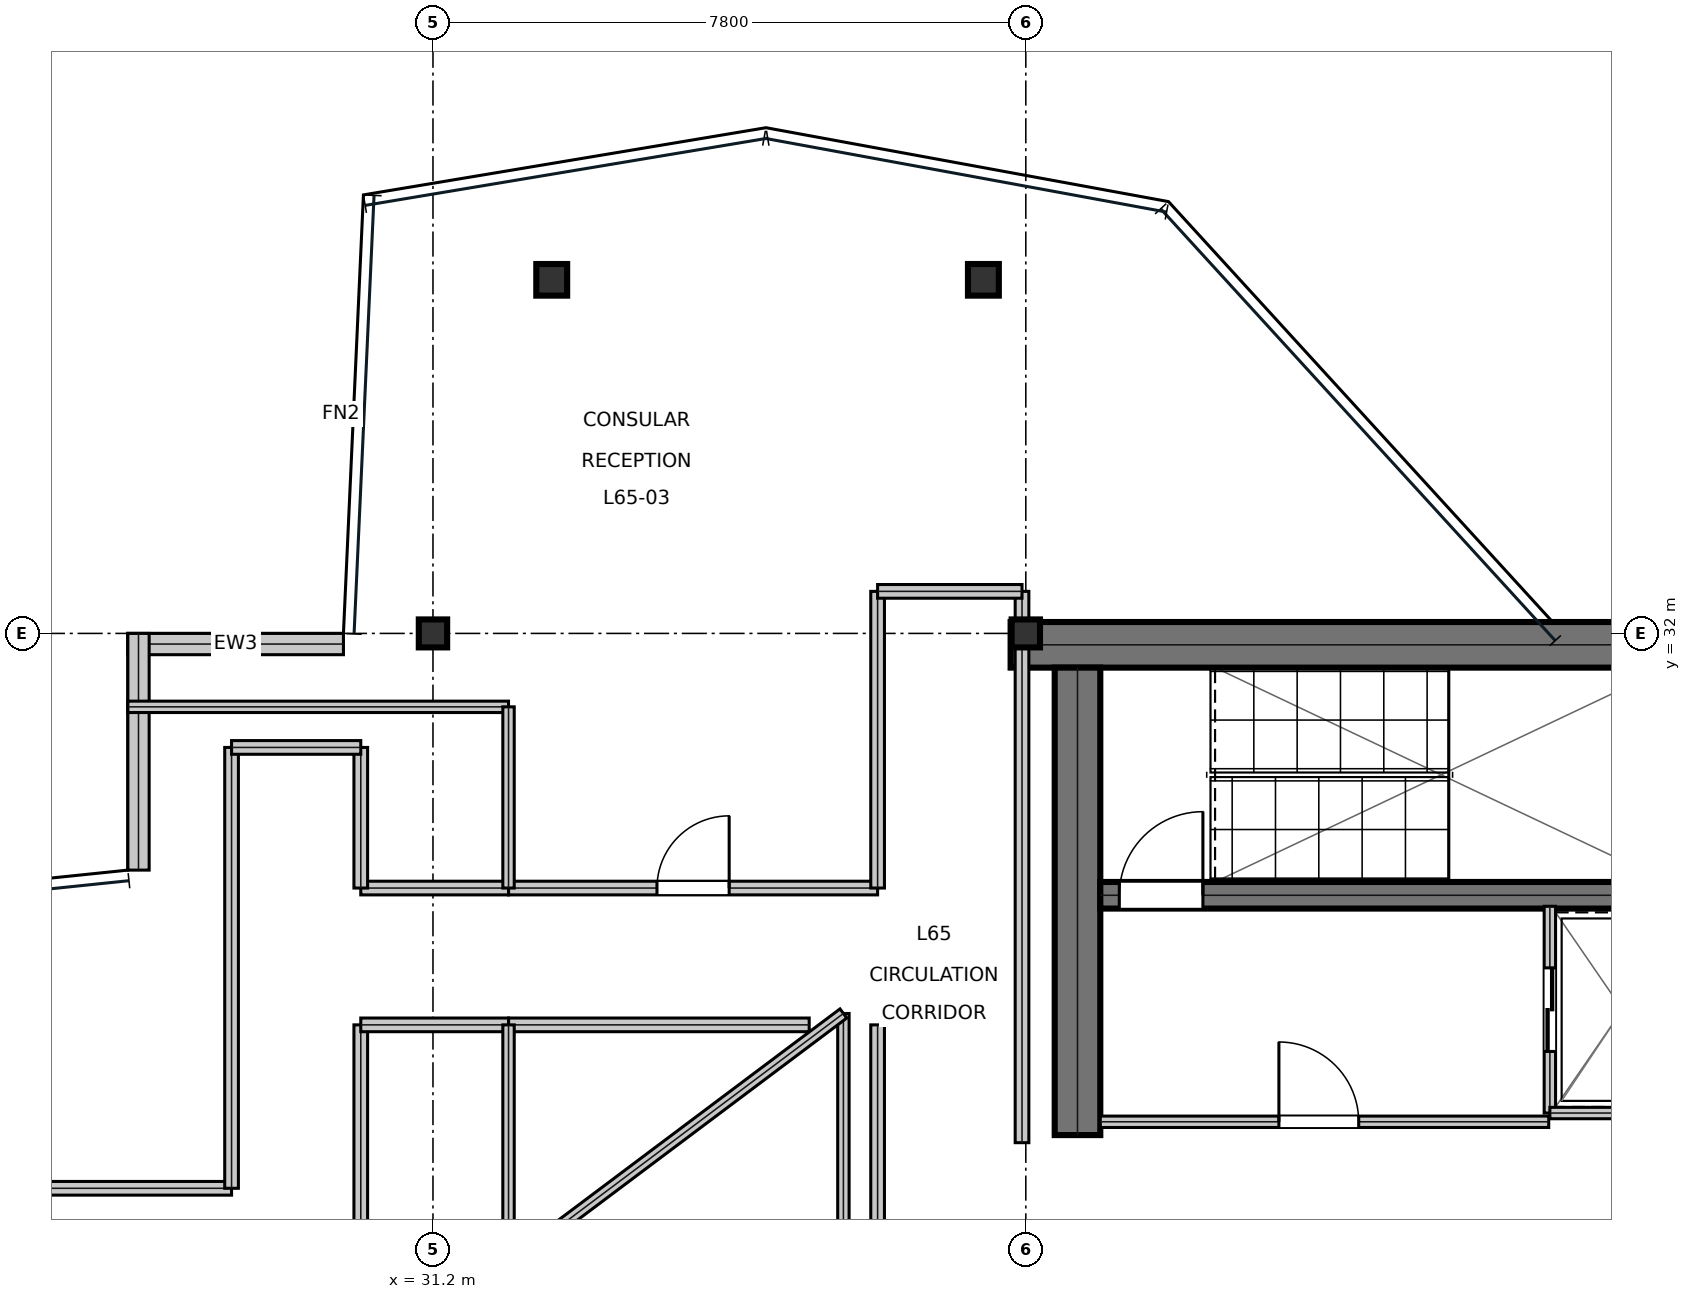
"""IFC4 building model, lengths in metres.
Left out: names, types, materials, properties, quantities, classifications, styles, units other than length and angle.
Written with IfcOpenShell. Run it as: python <this file> out.ifc"""

import sys

from ifc_helpers import new_model, si_unit, direction, frame, frame_2d, origin, origin_2d, place, context, subcontext, project, spatial, rectangle, i_section, extrude, element, fill, save


model = new_model("IFC4")
c1 = context("Model", 3, precision=1e-05, world=origin(), true_north=direction((0.0, 1.0)))
c2 = subcontext(c1, "Body", "Model", "MODEL_VIEW")
j1 = project(units=[si_unit("LENGTHUNIT", "METRE"), si_unit("PLANEANGLEUNIT", "RADIAN")], contexts=[c1])
p1 = place(None, origin())
s1 = spatial("IfcSite", under=j1, at=p1, CompositionType="ELEMENT")
p2 = place(p1, origin())
s2 = spatial("IfcBuilding", under=s1, at=p2, CompositionType="ELEMENT")
p3 = place(p2, frame((0.0, 0.0, 279.0)))
s3 = spatial("IfcBuildingStorey", under=s2, at=p3, CompositionType="ELEMENT", Elevation=279.0)
p4 = place(p3, frame((38.8, 31.85, 0.0), z_axis=(0.0, 0.0, 1.0), x_axis=(1.0, 0.0, 0.0)))
e1 = element("IfcWall", 1, at=p4, inside=s3, PredefinedType="SHEAR", context=c2, shape_type="SweptSolid", body=[
    extrude(rectangle(XDim=16.0, YDim=0.6, at=frame_2d((8.0, 0.0))), origin(), (0.0, 0.0, 1.0), 3.81),
])
p5 = place(p3, frame((39.68, 25.4, 0.0), z_axis=(0.0, 0.0, 1.0), x_axis=(0.0, 1.0, 0.0)))
e2 = element("IfcWall", 2, at=p5, inside=s3, PredefinedType="SHEAR", context=c2, shape_type="SweptSolid", body=[
    extrude(rectangle(XDim=6.15, YDim=0.6, at=frame_2d((3.075, 0.0))), origin(), (0.0, 0.0, 1.0), 3.81),
])
p6 = place(p3, frame((39.98, 28.555, 0.0), z_axis=(0.0, 0.0, 1.0), x_axis=(1.0, 0.0, 0.0)))
e3 = element("IfcWall", 3, at=p6, inside=s3, PredefinedType="SHEAR", context=c2, shape_type="SweptSolid", body=[
    extrude(rectangle(XDim=7.71, YDim=0.35, at=frame_2d((3.855, 0.0))), origin(), (0.0, 0.0, 1.0), 3.81),
])
p7 = place(p6, frame((0.25, 0.0, 0.0)))
e4 = element("IfcOpeningElement", 4, at=p7, cuts=e3, PredefinedType="OPENING", context=c2, shape_type="SweptSolid", body=[
    extrude(rectangle(XDim=1.1, YDim=2.15, at=frame_2d((0.55, 1.075))), frame((0.0, 0.185, 0.0), z_axis=(0.0, -1.0, 0.0), x_axis=(1.0, 0.0, 0.0)), (0.0, 0.0, 1.0), 0.37),
])
for number, where, z_axis, x_axis in (
    (5, (31.2, 32.0, 0.0), (0.0, 0.0, 1.0), (1.0, 0.0, 0.0)),
    (6, (39.0, 32.0, 0.0), (0.0, 0.0, 1.0), (1.0, 0.0, 0.0)),
):
    element("IfcColumn", number, at=place(p3, frame(where, z_axis=z_axis, x_axis=x_axis)), inside=s3, PredefinedType="COLUMN", context=c2, shape_type="SweptSolid", body=[
        extrude(i_section(OverallWidth=0.373, OverallDepth=0.368, WebThickness=0.015, FlangeThickness=0.024, at=origin_2d()), origin(), (0.0, 0.0, 1.0), 4.044),
    ])
for number, where, z_axis, x_axis in (
    (7, (32.762, 36.652, 0.016), (0.0, 0.0, 1.0), (1.0, 0.0, 0.0)),
    (8, (38.442, 36.652, 0.016), (0.0, 0.0, 1.0), (1.0, 0.0, 0.0)),
):
    element("IfcColumn", number, at=place(p3, frame(where, z_axis=z_axis, x_axis=x_axis)), inside=s3, PredefinedType="COLUMN", context=c2, shape_type="SweptSolid", body=[
        extrude(i_section(OverallWidth=0.406, OverallDepth=0.416, WebThickness=0.03, FlangeThickness=0.048, at=origin_2d()), origin(), (0.0, 0.0, 1.0), 4.018),
    ])
p8 = place(p3, frame((30.022, 31.86, 0.0), z_axis=(0.0, 0.0, 1.0), x_axis=(-1.0, 0.0, 0.0)))
e9 = element("IfcWall", 9, at=p8, inside=s3, PredefinedType="STANDARD", context=c2, shape_type="SweptSolid", body=[
    extrude(rectangle(XDim=2.836, YDim=0.28, at=frame_2d((1.418, 0.0))), origin(), (0.0, 0.0, 1.0), 3.81),
])
p9 = place(p3, frame((27.326, 32.0, 0.0), z_axis=(0.0, 0.0, 1.0), x_axis=(0.0, -1.0, 0.0)))
e10 = element("IfcWall", 10, at=p9, inside=s3, PredefinedType="STANDARD", context=c2, shape_type="SweptSolid", body=[
    extrude(rectangle(XDim=3.114, YDim=0.28, at=frame_2d((1.557, 0.0))), origin(), (0.0, 0.0, 1.0), 3.339),
])
p10 = place(p3, frame((39.98, 25.575, 0.0), z_axis=(0.0, 0.0, 1.0), x_axis=(1.0, 0.0, 0.0)))
e11 = element("IfcWall", 11, at=p10, inside=s3, PredefinedType="PARTITIONING", context=c2, shape_type="SweptSolid", body=[
    extrude(rectangle(XDim=5.9, YDim=0.15, at=frame_2d((2.95, 0.0))), origin(), (0.0, 0.0, 1.0), 3.81),
])
p11 = place(p10, frame((2.35, 0.0, 0.0)))
e12 = element("IfcOpeningElement", 12, at=p11, cuts=e11, PredefinedType="OPENING", context=c2, shape_type="SweptSolid", body=[
    extrude(rectangle(XDim=1.05, YDim=2.15, at=frame_2d((0.525, 1.075))), frame((0.0, 0.085, 0.0), z_axis=(0.0, -1.0, 0.0), x_axis=(1.0, 0.0, 0.0)), (0.0, 0.0, 1.0), 0.17),
])
p12 = place(p3, frame((45.895, 25.69, 0.0), z_axis=(0.0, 0.0, 1.0), x_axis=(0.0, 1.0, 0.0)))
e13 = element("IfcWall", 13, at=p12, inside=s3, PredefinedType="PARTITIONING", context=c2, shape_type="SweptSolid", body=[
    extrude(rectangle(XDim=2.72, YDim=0.15, at=frame_2d((1.36, 0.0))), origin(), (0.0, 0.0, 1.0), 3.81),
])
p13 = place(p12, frame((0.81, 0.0, 0.0)))
e14 = element("IfcOpeningElement", 14, at=p13, cuts=e13, PredefinedType="OPENING", context=c2, shape_type="SweptSolid", body=[
    extrude(rectangle(XDim=1.1, YDim=2.15, at=frame_2d((0.55, 1.075))), frame((0.0, 0.085, 0.0), z_axis=(0.0, -1.0, 0.0), x_axis=(1.0, 0.0, 0.0)), (0.0, 0.0, 1.0), 0.17),
])
p14 = place(p3, frame((45.895, 25.69, 0.0), z_axis=(0.0, 0.0, 1.0), x_axis=(1.0, 0.0, 0.0)))
e15 = element("IfcWall", 15, at=p14, inside=s3, PredefinedType="PARTITIONING", context=c2, shape_type="SweptSolid", body=[
    extrude(rectangle(XDim=1.915, YDim=0.15, at=frame_2d((0.958, 0.0))), origin(), (0.0, 0.0, 1.0), 3.81),
])
p15 = place(p3, frame((37.05, 15.447, 0.0), z_axis=(0.0, 0.0, 1.0), x_axis=(0.0, 1.0, 0.0)))
e16 = element("IfcWall", 16, at=p15, inside=s3, PredefinedType="SOLIDWALL", context=c2, shape_type="SweptSolid", body=[
    extrude(rectangle(XDim=11.403, YDim=0.18, at=frame_2d((5.702, 0.0))), origin(), (0.0, 0.0, 1.0), 3.27),
])
p16 = place(p15, frame((3.607, 0.0, 0.0)))
e17 = element("IfcOpeningElement", 17, at=p16, cuts=e16, PredefinedType="OPENING", context=c2, shape_type="SweptSolid", body=[
    extrude(rectangle(XDim=0.95, YDim=2.15, at=frame_2d((0.475, 1.075))), frame((0.0, 0.1, 0.0), z_axis=(0.0, -1.0, 0.0), x_axis=(1.0, 0.0, 0.0)), (0.0, 0.0, 1.0), 0.2),
])
p17 = place(p3, frame((30.25, 17.5, 0.0), z_axis=(0.0, 0.0, 1.0), x_axis=(0.0, 1.0, 0.0)))
e18 = element("IfcWall", 18, at=p17, inside=s3, PredefinedType="SOLIDWALL", context=c2, shape_type="SweptSolid", body=[
    extrude(rectangle(XDim=9.35, YDim=0.18, at=frame_2d((4.675, 0.0))), origin(), (0.0, 0.0, 1.0), 3.27),
])
p18 = place(p17, frame((4.02, 0.0, 0.0)))
e19 = element("IfcOpeningElement", 19, at=p18, cuts=e18, PredefinedType="OPENING", context=c2, shape_type="SweptSolid", body=[
    extrude(rectangle(XDim=0.95, YDim=2.15, at=frame_2d((0.475, 1.075))), frame((0.0, 0.1, 0.0), z_axis=(0.0, -1.0, 0.0), x_axis=(1.0, 0.0, 0.0)), (0.0, 0.0, 1.0), 0.2),
])
p19 = place(p3, frame((32.194, 28.65, 0.0), z_axis=(0.0, 0.0, 1.0), x_axis=(1.0, 0.0, 0.0)))
e20 = element("IfcWall", 20, at=p19, inside=s3, PredefinedType="SOLIDWALL", context=c2, shape_type="SweptSolid", body=[
    extrude(rectangle(XDim=4.856, YDim=0.18, at=frame_2d((2.428, 0.0))), origin(), (0.0, 0.0, 1.0), 3.81),
])
p20 = place(p19, frame((1.953, 0.0, 0.0)))
e21 = element("IfcOpeningElement", 21, at=p20, cuts=e20, PredefinedType="OPENING", context=c2, shape_type="SweptSolid", body=[
    extrude(rectangle(XDim=0.95, YDim=2.15, at=frame_2d((0.475, 1.075))), frame((0.0, 0.1, 0.0), z_axis=(0.0, -1.0, 0.0), x_axis=(1.0, 0.0, 0.0)), (0.0, 0.0, 1.0), 0.2),
])
p21 = place(p3, frame((32.194, 26.85, 0.0), z_axis=(0.0, 0.0, 1.0), x_axis=(1.0, 0.0, 0.0)))
e22 = element("IfcWall", 22, at=p21, inside=s3, PredefinedType="SOLIDWALL", context=c2, shape_type="SweptSolid", body=[
    extrude(rectangle(XDim=3.956, YDim=0.18, at=frame_2d((1.978, 0.0))), origin(), (0.0, 0.0, 1.0), 3.81),
])
p22 = place(p3, frame((21.0, 24.7, 0.0), z_axis=(0.0, 0.0, 1.0), x_axis=(1.0, 0.0, 0.0)))
e23 = element("IfcWall", 23, at=p22, inside=s3, PredefinedType="SOLIDWALL", context=c2, shape_type="SweptSolid", body=[
    extrude(rectangle(XDim=7.55, YDim=0.18, at=frame_2d((3.775, 0.0))), origin(), (0.0, 0.0, 1.0), 3.27),
])
p23 = place(p3, frame((28.55, 24.7, 0.0), z_axis=(0.0, 0.0, 1.0), x_axis=(0.0, 1.0, 0.0)))
e24 = element("IfcWall", 24, at=p23, inside=s3, PredefinedType="SOLIDWALL", context=c2, shape_type="SweptSolid", body=[
    extrude(rectangle(XDim=5.8, YDim=0.18, at=frame_2d((2.9, 0.0))), origin(), (0.0, 0.0, 1.0), 3.81),
])
for number, where, z_axis, x_axis in (
    (25, (30.25, 26.85, 0.0), (0.0, 0.0, 1.0), (1.0, 0.0, 0.0)),
    (26, (30.25, 28.65, 0.0), (0.0, 0.0, 1.0), (1.0, 0.0, 0.0)),
):
    element("IfcWall", number, at=place(p3, frame(where, z_axis=z_axis, x_axis=x_axis)), inside=s3, PredefinedType="SOLIDWALL", context=c2, shape_type="SweptSolid", body=[
        extrude(rectangle(XDim=1.944, YDim=0.18, at=frame_2d((0.972, 0.0))), origin(), (0.0, 0.0, 1.0), 3.27),
    ])
p24 = place(p3, frame((30.25, 28.65, 0.0), z_axis=(0.0, 0.0, 1.0), x_axis=(0.0, 1.0, 0.0)))
e27 = element("IfcWall", 27, at=p24, inside=s3, PredefinedType="SOLIDWALL", context=c2, shape_type="SweptSolid", body=[
    extrude(rectangle(XDim=1.85, YDim=0.18, at=frame_2d((0.925, 0.0))), origin(), (0.0, 0.0, 1.0), 3.81),
])
p25 = place(p3, frame((28.55, 30.5, 0.0), z_axis=(0.0, 0.0, 1.0), x_axis=(1.0, 0.0, 0.0)))
e28 = element("IfcWall", 28, at=p25, inside=s3, PredefinedType="SOLIDWALL", context=c2, shape_type="SweptSolid", body=[
    extrude(rectangle(XDim=1.7, YDim=0.18, at=frame_2d((0.85, 0.0))), origin(), (0.0, 0.0, 1.0), 3.81),
])
p26 = place(p3, frame((38.95, 25.3, 0.0), z_axis=(0.0, 0.0, 1.0), x_axis=(0.0, 1.0, 0.0)))
e29 = element("IfcWall", 29, at=p26, inside=s3, PredefinedType="SOLIDWALL", context=c2, shape_type="SweptSolid", body=[
    extrude(rectangle(XDim=7.253, YDim=0.18, at=frame_2d((3.626, 0.0))), origin(), (0.0, 0.0, 1.0), 3.27),
])
p27 = place(p3, frame((37.05, 28.65, 0.0), z_axis=(0.0, 0.0, 1.0), x_axis=(0.0, 1.0, 0.0)))
e30 = element("IfcWall", 30, at=p27, inside=s3, PredefinedType="SOLIDWALL", context=c2, shape_type="SweptSolid", body=[
    extrude(rectangle(XDim=3.903, YDim=0.18, at=frame_2d((1.952, 0.0))), origin(), (0.0, 0.0, 1.0), 3.27),
])
p28 = place(p3, frame((37.05, 32.553, 0.0), z_axis=(0.0, 0.0, 1.0), x_axis=(1.0, 0.0, 0.0)))
e31 = element("IfcWall", 31, at=p28, inside=s3, PredefinedType="SOLIDWALL", context=c2, shape_type="SweptSolid", body=[
    extrude(rectangle(XDim=1.9, YDim=0.18, at=frame_2d((0.95, 0.0))), origin(), (0.0, 0.0, 1.0), 3.27),
])
p29 = place(p3, frame((32.194, 15.794, 0.0), z_axis=(0.0, 0.0, 1.0), x_axis=(0.0, 1.0, 0.0)))
e32 = element("IfcWall", 32, at=p29, inside=s3, PredefinedType="MOVABLE", context=c2, shape_type="SweptSolid", body=[
    extrude(rectangle(XDim=11.056, YDim=0.15, at=frame_2d((5.528, 0.0))), origin(), (0.0, 0.0, 1.0), 3.27),
])
p30 = place(p3, frame((27.186, 31.034, 0.0), z_axis=(0.0, 0.0, 1.0), x_axis=(1.0, 0.0, 0.0)))
e33 = element("IfcWall", 33, at=p30, inside=s3, PredefinedType="MOVABLE", context=c2, shape_type="SweptSolid", body=[
    extrude(rectangle(XDim=5.009, YDim=0.15, at=frame_2d((2.504, 0.0))), origin(), (0.0, 0.0, 1.0), 3.27),
])
p31 = place(p3, frame((32.194, 28.65, 0.0), z_axis=(0.0, 0.0, 1.0), x_axis=(0.0, 1.0, 0.0)))
e34 = element("IfcWall", 34, at=p31, inside=s3, PredefinedType="MOVABLE", context=c2, shape_type="SweptSolid", body=[
    extrude(rectangle(XDim=2.384, YDim=0.15, at=frame_2d((1.192, 0.0))), origin(), (0.0, 0.0, 1.0), 3.54),
])
p32 = place(p3, frame((36.6, 21.0, 0.0), z_axis=(0.0, 0.0, 1.0), x_axis=(0.0, 1.0, 0.0)))
e35 = element("IfcWall", 35, at=p32, inside=s3, PredefinedType="MOVABLE", context=c2, shape_type="SweptSolid", body=[
    extrude(rectangle(XDim=6.0, YDim=0.15, at=frame_2d((3.0, 0.0))), origin(), (0.0, 0.0, 1.0), 3.81),
])
p33 = place(p3, frame((36.6, 27.0, 0.0), z_axis=(0.0, 0.0, 1.0), x_axis=(-0.8, -0.6, 0.0)))
e36 = element("IfcWall", 36, at=p33, inside=s3, PredefinedType="MOVABLE", context=c2, shape_type="SweptSolid", body=[
    extrude(rectangle(XDim=5.0, YDim=0.15, at=frame_2d((2.5, 0.0))), origin(), (0.0, 0.0, 1.0), 3.81),
])
p34 = place(p11, origin())
e37 = element("IfcDoor", 37, at=p34, inside=s3, OperationType="SINGLE_SWING_LEFT", PredefinedType="DOOR", context=c2, shape_type="SweptSolid", body=[
    extrude(rectangle(XDim=1.05, YDim=2.15, at=frame_2d((0.525, 1.075))), frame((0.0, 0.025, 0.0), z_axis=(0.0, -1.0, 0.0), x_axis=(1.0, 0.0, 0.0)), (0.0, 0.0, 1.0), 0.05),
])
fill(e12, e37)
p35 = place(p13, frame((1.1, 0.0, 0.0), z_axis=(0.0, 0.0, 1.0), x_axis=(-1.0, 0.0, 0.0)))
e38 = element("IfcDoor", 38, at=p35, inside=s3, OperationType="DOUBLE_DOOR_SLIDING", PredefinedType="DOOR", context=c2, shape_type="SweptSolid", body=[
    extrude(rectangle(XDim=1.1, YDim=2.15, at=frame_2d((0.55, 1.075))), frame((0.0, 0.025, 0.0), z_axis=(0.0, -1.0, 0.0), x_axis=(1.0, 0.0, 0.0)), (0.0, 0.0, 1.0), 0.05),
])
fill(e14, e38)
p36 = place(p20, origin())
e39 = element("IfcDoor", 39, at=p36, inside=s3, OperationType="SINGLE_SWING_RIGHT", PredefinedType="DOOR", context=c2, shape_type="SweptSolid", body=[
    extrude(rectangle(XDim=0.95, YDim=2.15, at=frame_2d((0.475, 1.075))), frame((0.0, 0.025, 0.0), z_axis=(0.0, -1.0, 0.0), x_axis=(1.0, 0.0, 0.0)), (0.0, 0.0, 1.0), 0.05),
])
fill(e21, e39)
p37 = place(p7, origin())
e40 = element("IfcDoor", 40, at=p37, inside=s3, OperationType="SINGLE_SWING_RIGHT", PredefinedType="DOOR", context=c2, shape_type="SweptSolid", body=[
    extrude(rectangle(XDim=1.1, YDim=2.15, at=frame_2d((0.55, 1.075))), frame((0.0, 0.025, 0.0), z_axis=(0.0, -1.0, 0.0), x_axis=(1.0, 0.0, 0.0)), (0.0, 0.0, 1.0), 0.05),
])
fill(e4, e40)
save(model, sys.argv[1])
